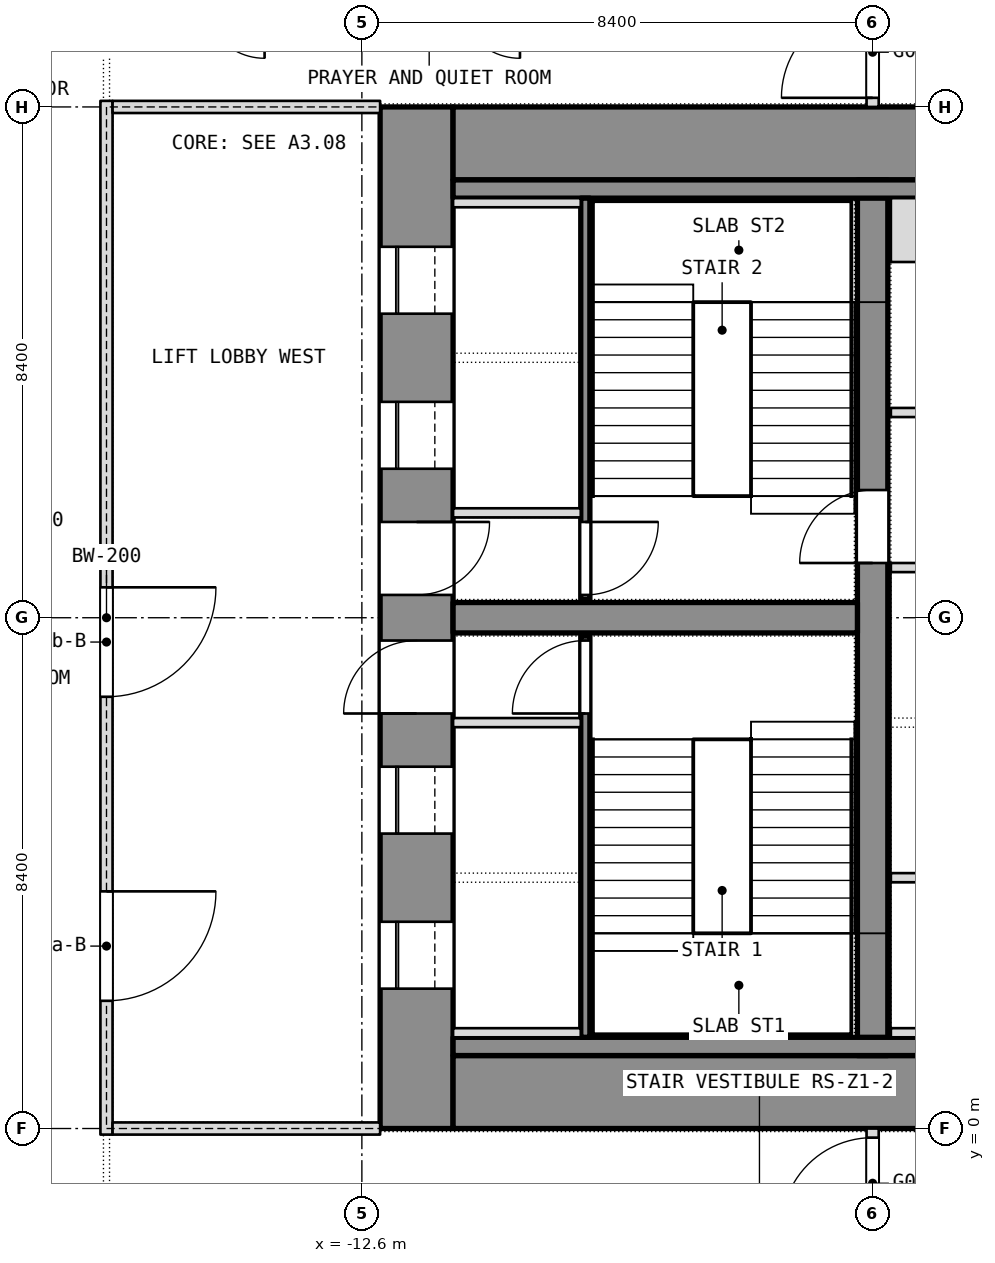
"""IFC4 building model, lengths in metres.
Left out: names, types, materials, properties, quantities, classifications, styles, units other than length and angle.
Written with IfcOpenShell. Run it as: python <this file> out.ifc"""

import sys

from ifc_helpers import new_model, si_unit, direction, frame, frame_2d, origin, place, context, subcontext, project, spatial, rectangle, extrude, element, fill, save


model = new_model("IFC4")
c1 = context("Model", 3, precision=1e-05, world=origin(), true_north=direction((0.0, 1.0)))
c2 = subcontext(c1, "Body", "Model", "MODEL_VIEW")
j1 = project(units=[si_unit("LENGTHUNIT", "METRE"), si_unit("PLANEANGLEUNIT", "RADIAN")], contexts=[c1])
p1 = place(None, origin())
s1 = spatial("IfcSite", under=j1, at=p1, CompositionType="ELEMENT")
p2 = place(p1, origin())
s2 = spatial("IfcBuilding", under=s1, at=p2, CompositionType="ELEMENT")
p3 = place(p2, frame((0.0, 0.0, 47.3)))
s3 = spatial("IfcBuildingStorey", under=s2, at=p3, CompositionType="ELEMENT", Elevation=47.3)
p4 = place(p3, frame((-11.7, 0.0, 0.0), z_axis=(0.0, 0.0, 1.0), x_axis=(0.0, 1.0, 0.0)))
e1 = element("IfcWall", 1, at=p4, inside=s3, PredefinedType="SHEAR", context=c2, shape_type="SweptSolid", body=[
    extrude(rectangle(XDim=16.8, YDim=1.2, at=frame_2d((8.4, 0.0))), origin(), (0.0, 0.0, 1.0), 3.6),
])
p5 = place(p4, frame((2.3, 0.0, 0.0)))
e2 = element("IfcOpeningElement", 2, at=p5, cuts=e1, PredefinedType="OPENING", context=c2, shape_type="SweptSolid", body=[
    extrude(rectangle(XDim=1.1, YDim=2.1, at=frame_2d((0.55, 1.05))), frame((0.0, 0.6, 0.0), z_axis=(0.0, -1.0, 0.0), x_axis=(1.0, 0.0, 0.0)), (0.0, 0.0, 1.0), 1.2),
])
p6 = place(p4, frame((4.85, 0.0, 0.0)))
e3 = element("IfcOpeningElement", 3, at=p6, cuts=e1, PredefinedType="OPENING", context=c2, shape_type="SweptSolid", body=[
    extrude(rectangle(XDim=1.1, YDim=2.1, at=frame_2d((0.55, 1.05))), frame((0.0, 0.6, 0.0), z_axis=(0.0, -1.0, 0.0), x_axis=(1.0, 0.0, 0.0)), (0.0, 0.0, 1.0), 1.2),
])
p7 = place(p4, frame((6.825, 0.0, 0.0)))
e4 = element("IfcOpeningElement", 4, at=p7, cuts=e1, PredefinedType="OPENING", context=c2, shape_type="SweptSolid", body=[
    extrude(rectangle(XDim=1.2, YDim=2.1, at=frame_2d((0.6, 1.05))), frame((0.0, 0.6, 0.0), z_axis=(0.0, -1.0, 0.0), x_axis=(1.0, 0.0, 0.0)), (0.0, 0.0, 1.0), 1.2),
])
p8 = place(p4, frame((13.4, 0.0, 0.0)))
e5 = element("IfcOpeningElement", 5, at=p8, cuts=e1, PredefinedType="OPENING", context=c2, shape_type="SweptSolid", body=[
    extrude(rectangle(XDim=1.1, YDim=2.1, at=frame_2d((0.55, 1.05))), frame((0.0, 0.6, 0.0), z_axis=(0.0, -1.0, 0.0), x_axis=(1.0, 0.0, 0.0)), (0.0, 0.0, 1.0), 1.2),
])
p9 = place(p4, frame((10.85, 0.0, 0.0)))
e6 = element("IfcOpeningElement", 6, at=p9, cuts=e1, PredefinedType="OPENING", context=c2, shape_type="SweptSolid", body=[
    extrude(rectangle(XDim=1.1, YDim=2.1, at=frame_2d((0.55, 1.05))), frame((0.0, 0.6, 0.0), z_axis=(0.0, -1.0, 0.0), x_axis=(1.0, 0.0, 0.0)), (0.0, 0.0, 1.0), 1.2),
])
p10 = place(p4, frame((8.775, 0.0, 0.0)))
e7 = element("IfcOpeningElement", 7, at=p10, cuts=e1, PredefinedType="OPENING", context=c2, shape_type="SweptSolid", body=[
    extrude(rectangle(XDim=1.2, YDim=2.1, at=frame_2d((0.6, 1.05))), frame((0.0, 0.6, 0.0), z_axis=(0.0, -1.0, 0.0), x_axis=(1.0, 0.0, 0.0)), (0.0, 0.0, 1.0), 1.2),
])
for number, where, z_axis, x_axis in (
    (8, (-11.1, 0.6, 0.0), (0.0, 0.0, 1.0), (1.0, 0.0, 0.0)),
    (9, (-11.1, 16.2, 0.0), (0.0, 0.0, 1.0), (1.0, 0.0, 0.0)),
):
    element("IfcWall", number, at=place(p3, frame(where, z_axis=z_axis, x_axis=x_axis)), inside=s3, PredefinedType="SHEAR", context=c2, shape_type="SweptSolid", body=[
        extrude(rectangle(XDim=22.2, YDim=1.2, at=frame_2d((11.1, 0.0))), origin(), (0.0, 0.0, 1.0), 3.6),
    ])
p11 = place(p3, frame((-4.2, 1.2, 0.0), z_axis=(0.0, 0.0, 1.0), x_axis=(0.0, 1.0, 0.0)))
e10 = element("IfcWall", 10, at=p11, inside=s3, PredefinedType="SHEAR", context=c2, shape_type="SweptSolid", body=[
    extrude(rectangle(XDim=14.4, YDim=0.5, at=frame_2d((7.2, 0.0))), origin(), (0.0, 0.0, 1.0), 3.6),
])
p12 = place(p11, frame((8.1, 0.0, 0.0)))
e11 = element("IfcOpeningElement", 11, at=p12, cuts=e10, PredefinedType="OPENING", context=c2, shape_type="SweptSolid", body=[
    extrude(rectangle(XDim=1.2, YDim=2.1, at=frame_2d((0.6, 1.05))), frame((0.0, 0.25, 0.0), z_axis=(0.0, -1.0, 0.0), x_axis=(1.0, 0.0, 0.0)), (0.0, 0.0, 1.0), 0.5),
])
p13 = place(p3, frame((-11.1, 8.4, 0.0), z_axis=(0.0, 0.0, 1.0), x_axis=(1.0, 0.0, 0.0)))
e12 = element("IfcWall", 12, at=p13, inside=s3, PredefinedType="SHEAR", context=c2, shape_type="SweptSolid", body=[
    extrude(rectangle(XDim=6.65, YDim=0.5, at=frame_2d((3.325, 0.0))), origin(), (0.0, 0.0, 1.0), 3.6),
])
p14 = place(p3, frame((-4.2, 16.8, 0.0), z_axis=(0.0, 0.0, 1.0), x_axis=(0.0, 1.0, 0.0)))
e13 = element("IfcWall", 13, at=p14, inside=s3, PredefinedType="PARTITIONING", context=c2, shape_type="SweptSolid", body=[
    extrude(rectangle(XDim=6.7, YDim=0.2, at=frame_2d((3.35, 0.0))), origin(), (0.0, 0.0, 1.0), 3.34),
])
p15 = place(p14, frame((0.15, 0.0, 0.0)))
e14 = element("IfcOpeningElement", 14, at=p15, cuts=e13, PredefinedType="OPENING", context=c2, shape_type="SweptSolid", body=[
    extrude(rectangle(XDim=1.5, YDim=2.1, at=frame_2d((0.75, 1.05))), frame((0.0, 0.1, 0.0), z_axis=(0.0, -1.0, 0.0), x_axis=(1.0, 0.0, 0.0)), (0.0, 0.0, 1.0), 0.2),
])
p16 = place(p14, frame((4.95, 0.0, 0.0)))
e15 = element("IfcOpeningElement", 15, at=p16, cuts=e13, PredefinedType="OPENING", context=c2, shape_type="SweptSolid", body=[
    extrude(rectangle(XDim=1.5, YDim=2.1, at=frame_2d((0.75, 1.05))), frame((0.0, 0.1, 0.0), z_axis=(0.0, -1.0, 0.0), x_axis=(1.0, 0.0, 0.0)), (0.0, 0.0, 1.0), 0.2),
])
p17 = place(p3, frame((-4.2, -12.7, 0.0), z_axis=(0.0, 0.0, 1.0), x_axis=(0.0, 1.0, 0.0)))
e16 = element("IfcWall", 16, at=p17, inside=s3, PredefinedType="PARTITIONING", context=c2, shape_type="SweptSolid", body=[
    extrude(rectangle(XDim=12.7, YDim=0.2, at=frame_2d((6.35, 0.0))), origin(), (0.0, 0.0, 1.0), 3.34),
])
p18 = place(p17, frame((11.05, 0.0, 0.0)))
e17 = element("IfcOpeningElement", 17, at=p18, cuts=e16, PredefinedType="OPENING", context=c2, shape_type="SweptSolid", body=[
    extrude(rectangle(XDim=1.5, YDim=2.1, at=frame_2d((0.75, 1.05))), frame((0.0, 0.1, 0.0), z_axis=(0.0, -1.0, 0.0), x_axis=(1.0, 0.0, 0.0)), (0.0, 0.0, 1.0), 0.2),
])
p19 = place(p17, frame((0.225, 0.0, 0.0)))
e18 = element("IfcOpeningElement", 18, at=p19, cuts=e16, PredefinedType="OPENING", context=c2, shape_type="SweptSolid", body=[
    extrude(rectangle(XDim=1.5, YDim=2.1, at=frame_2d((0.75, 1.05))), frame((0.0, 0.1, 0.0), z_axis=(0.0, -1.0, 0.0), x_axis=(1.0, 0.0, 0.0)), (0.0, 0.0, 1.0), 0.2),
])
for number, where, z_axis, x_axis in (
    (19, (-11.1, 1.35, 0.0), (0.0, 0.0, 1.0), (1.0, 0.0, 0.0)),
    (20, (-11.1, 15.45, 0.0), (0.0, 0.0, 1.0), (1.0, 0.0, 0.0)),
):
    element("IfcWall", number, at=place(p3, frame(where, z_axis=z_axis, x_axis=x_axis)), inside=s3, PredefinedType="PARTITIONING", context=c2, shape_type="SweptSolid", body=[
        extrude(rectangle(XDim=22.2, YDim=0.3, at=frame_2d((11.1, 0.0))), origin(), (0.0, 0.0, 1.0), 3.34),
    ])
p20 = place(p3, frame((-8.925, 1.5, 0.0), z_axis=(0.0, 0.0, 1.0), x_axis=(0.0, 1.0, 0.0)))
e21 = element("IfcWall", 21, at=p20, inside=s3, PredefinedType="SHEAR", context=c2, shape_type="SweptSolid", body=[
    extrude(rectangle(XDim=6.6, YDim=0.15, at=frame_2d((3.3, 0.0))), origin(), (0.0, 0.0, 1.0), 3.34),
])
p21 = place(p20, frame((5.325, 0.0, 0.0)))
e22 = element("IfcOpeningElement", 22, at=p21, cuts=e21, PredefinedType="OPENING", context=c2, shape_type="SweptSolid", body=[
    extrude(rectangle(XDim=1.2, YDim=2.1, at=frame_2d((0.6, 1.05))), frame((0.0, 0.075, 0.0), z_axis=(0.0, -1.0, 0.0), x_axis=(1.0, 0.0, 0.0)), (0.0, 0.0, 1.0), 0.15),
])
for number, where, z_axis, x_axis in (
    (23, (-11.1, 6.675, 0.0), (0.0, 0.0, 1.0), (1.0, 0.0, 0.0)),
    (24, (-11.1, 1.575, 0.0), (0.0, 0.0, 1.0), (1.0, 0.0, 0.0)),
):
    element("IfcWall", number, at=place(p3, frame(where, z_axis=z_axis, x_axis=x_axis)), inside=s3, PredefinedType="SHEAR", context=c2, shape_type="SweptSolid", body=[
        extrude(rectangle(XDim=2.1, YDim=0.15, at=frame_2d((1.05, 0.0))), origin(), (0.0, 0.0, 1.0), 3.6),
    ])
p22 = place(p3, frame((-8.925, 8.7, 0.0), z_axis=(0.0, 0.0, 1.0), x_axis=(0.0, 1.0, 0.0)))
e25 = element("IfcWall", 25, at=p22, inside=s3, PredefinedType="SHEAR", context=c2, shape_type="SweptSolid", body=[
    extrude(rectangle(XDim=6.6, YDim=0.15, at=frame_2d((3.3, 0.0))), origin(), (0.0, 0.0, 1.0), 3.34),
])
p23 = place(p22, frame((0.075, 0.0, 0.0)))
e26 = element("IfcOpeningElement", 26, at=p23, cuts=e25, PredefinedType="OPENING", context=c2, shape_type="SweptSolid", body=[
    extrude(rectangle(XDim=1.2, YDim=2.1, at=frame_2d((0.6, 1.05))), frame((0.0, 0.075, 0.0), z_axis=(0.0, -1.0, 0.0), x_axis=(1.0, 0.0, 0.0)), (0.0, 0.0, 1.0), 0.15),
])
for number, where, z_axis, x_axis in (
    (27, (-11.1, 10.125, 0.0), (0.0, 0.0, 1.0), (1.0, 0.0, 0.0)),
    (28, (-11.1, 15.225, 0.0), (0.0, 0.0, 1.0), (1.0, 0.0, 0.0)),
):
    element("IfcWall", number, at=place(p3, frame(where, z_axis=z_axis, x_axis=x_axis)), inside=s3, PredefinedType="SHEAR", context=c2, shape_type="SweptSolid", body=[
        extrude(rectangle(XDim=2.1, YDim=0.15, at=frame_2d((1.05, 0.0))), origin(), (0.0, 0.0, 1.0), 3.6),
    ])
p24 = place(p3, frame((-3.9, 4.125, 0.0), z_axis=(0.0, 0.0, 1.0), x_axis=(1.0, 0.0, 0.0)))
e29 = element("IfcWall", 29, at=p24, inside=s3, PredefinedType="PARTITIONING", context=c2, shape_type="SweptSolid", body=[
    extrude(rectangle(XDim=7.8, YDim=0.15, at=frame_2d((3.9, 0.0))), origin(), (0.0, 0.0, 1.0), 3.34),
])
p25 = place(p24, frame((3.75, 0.0, 0.0)))
e30 = element("IfcOpeningElement", 30, at=p25, cuts=e29, PredefinedType="OPENING", context=c2, shape_type="SweptSolid", body=[
    extrude(rectangle(XDim=1.2, YDim=2.1, at=frame_2d((0.6, 1.05))), frame((0.0, 0.075, 0.0), z_axis=(0.0, -1.0, 0.0), x_axis=(1.0, 0.0, 0.0)), (0.0, 0.0, 1.0), 0.15),
])
p26 = place(p3, frame((-3.9, 11.775, 0.0), z_axis=(0.0, 0.0, 1.0), x_axis=(1.0, 0.0, 0.0)))
e31 = element("IfcWall", 31, at=p26, inside=s3, PredefinedType="PARTITIONING", context=c2, shape_type="SweptSolid", body=[
    extrude(rectangle(XDim=7.8, YDim=0.15, at=frame_2d((3.9, 0.0))), origin(), (0.0, 0.0, 1.0), 3.34),
])
p27 = place(p26, frame((3.3, 0.0, 0.0)))
e32 = element("IfcOpeningElement", 32, at=p27, cuts=e31, PredefinedType="OPENING", context=c2, shape_type="SweptSolid", body=[
    extrude(rectangle(XDim=1.2, YDim=2.1, at=frame_2d((0.6, 1.05))), frame((0.0, 0.075, 0.0), z_axis=(0.0, -1.0, 0.0), x_axis=(1.0, 0.0, 0.0)), (0.0, 0.0, 1.0), 0.15),
])
p28 = place(p3, frame((-3.9, 1.575, 0.0), z_axis=(0.0, 0.0, 1.0), x_axis=(1.0, 0.0, 0.0)))
e33 = element("IfcWall", 33, at=p28, inside=s3, PredefinedType="SHEAR", context=c2, shape_type="SweptSolid", body=[
    extrude(rectangle(XDim=3.0, YDim=0.15, at=frame_2d((1.5, 0.0))), origin(), (0.0, 0.0, 1.0), 3.6),
])
p29 = place(p3, frame((-3.9, 9.225, 0.0), z_axis=(0.0, 0.0, 1.0), x_axis=(1.0, 0.0, 0.0)))
e34 = element("IfcWall", 34, at=p29, inside=s3, PredefinedType="SHEAR", context=c2, shape_type="SweptSolid", body=[
    extrude(rectangle(XDim=2.25, YDim=0.15, at=frame_2d((1.125, 0.0))), origin(), (0.0, 0.0, 1.0), 3.6),
])
p30 = place(p3, frame((-3.9, 14.775, 0.0), z_axis=(0.0, 0.0, 1.0), x_axis=(1.0, 0.0, 0.0)))
e35 = element("IfcWall", 35, at=p30, inside=s3, PredefinedType="PARTITIONING", context=c2, shape_type="SweptSolid", body=[
    extrude(rectangle(XDim=2.25, YDim=1.05, at=frame_2d((1.125, 0.0))), origin(), (0.0, 0.0, 1.0), 3.34),
])
p31 = place(p3, frame((-16.8, -0.1, 0.0), z_axis=(0.0, 0.0, 1.0), x_axis=(0.0, 1.0, 0.0)))
e36 = element("IfcWall", 36, at=p31, inside=s3, PredefinedType="PARTITIONING", context=c2, shape_type="SweptSolid", body=[
    extrude(rectangle(XDim=17.0, YDim=0.2, at=frame_2d((8.5, 0.0))), origin(), (0.0, 0.0, 1.0), 3.34),
])
p32 = place(p31, frame((2.2, 0.0, 0.0)))
e37 = element("IfcOpeningElement", 37, at=p32, cuts=e36, PredefinedType="OPENING", context=c2, shape_type="SweptSolid", body=[
    extrude(rectangle(XDim=1.8, YDim=2.1, at=frame_2d((0.9, 1.05))), frame((0.0, 0.1, 0.0), z_axis=(0.0, -1.0, 0.0), x_axis=(1.0, 0.0, 0.0)), (0.0, 0.0, 1.0), 0.2),
])
p33 = place(p31, frame((7.2, 0.0, 0.0)))
e38 = element("IfcOpeningElement", 38, at=p33, cuts=e36, PredefinedType="OPENING", context=c2, shape_type="SweptSolid", body=[
    extrude(rectangle(XDim=1.8, YDim=2.1, at=frame_2d((0.9, 1.05))), frame((0.0, 0.1, 0.0), z_axis=(0.0, -1.0, 0.0), x_axis=(1.0, 0.0, 0.0)), (0.0, 0.0, 1.0), 0.2),
])
for number, where, z_axis, x_axis in (
    (39, (-16.7, 0.0, 0.0), (0.0, 0.0, 1.0), (1.0, 0.0, 0.0)),
    (40, (-16.7, 16.8, 0.0), (0.0, 0.0, 1.0), (1.0, 0.0, 0.0)),
):
    element("IfcWall", number, at=place(p3, frame(where, z_axis=z_axis, x_axis=x_axis)), inside=s3, PredefinedType="PARTITIONING", context=c2, shape_type="SweptSolid", body=[
        extrude(rectangle(XDim=4.4, YDim=0.2, at=frame_2d((2.2, 0.0))), origin(), (0.0, 0.0, 1.0), 2.84),
    ])
p34 = place(p5, origin())
e41 = element("IfcDoor", 41, at=p34, inside=s3, OperationType="SLIDING_TO_LEFT", PredefinedType="DOOR", context=c2, shape_type="SweptSolid", body=[
    extrude(rectangle(XDim=1.1, YDim=2.1, at=frame_2d((0.55, 1.05))), frame((0.0, 0.025, 0.0), z_axis=(0.0, -1.0, 0.0), x_axis=(1.0, 0.0, 0.0)), (0.0, 0.0, 1.0), 0.05),
])
fill(e2, e41)
p35 = place(p6, origin())
e42 = element("IfcDoor", 42, at=p35, inside=s3, OperationType="SLIDING_TO_LEFT", PredefinedType="DOOR", context=c2, shape_type="SweptSolid", body=[
    extrude(rectangle(XDim=1.1, YDim=2.1, at=frame_2d((0.55, 1.05))), frame((0.0, 0.025, 0.0), z_axis=(0.0, -1.0, 0.0), x_axis=(1.0, 0.0, 0.0)), (0.0, 0.0, 1.0), 0.05),
])
fill(e3, e42)
p36 = place(p7, origin())
e43 = element("IfcDoor", 43, at=p36, inside=s3, OperationType="SINGLE_SWING_LEFT", PredefinedType="DOOR", context=c2, shape_type="SweptSolid", body=[
    extrude(rectangle(XDim=1.2, YDim=2.1, at=frame_2d((0.6, 1.05))), frame((0.0, 0.025, 0.0), z_axis=(0.0, -1.0, 0.0), x_axis=(1.0, 0.0, 0.0)), (0.0, 0.0, 1.0), 0.05),
])
fill(e4, e43)
p37 = place(p21, origin())
e44 = element("IfcDoor", 44, at=p37, inside=s3, OperationType="SINGLE_SWING_LEFT", PredefinedType="DOOR", context=c2, shape_type="SweptSolid", body=[
    extrude(rectangle(XDim=1.2, YDim=2.1, at=frame_2d((0.6, 1.05))), frame((0.0, 0.025, 0.0), z_axis=(0.0, -1.0, 0.0), x_axis=(1.0, 0.0, 0.0)), (0.0, 0.0, 1.0), 0.05),
])
fill(e22, e44)
p38 = place(p8, origin())
e45 = element("IfcDoor", 45, at=p38, inside=s3, OperationType="SLIDING_TO_LEFT", PredefinedType="DOOR", context=c2, shape_type="SweptSolid", body=[
    extrude(rectangle(XDim=1.1, YDim=2.1, at=frame_2d((0.55, 1.05))), frame((0.0, 0.025, 0.0), z_axis=(0.0, -1.0, 0.0), x_axis=(1.0, 0.0, 0.0)), (0.0, 0.0, 1.0), 0.05),
])
fill(e5, e45)
p39 = place(p9, origin())
e46 = element("IfcDoor", 46, at=p39, inside=s3, OperationType="SLIDING_TO_LEFT", PredefinedType="DOOR", context=c2, shape_type="SweptSolid", body=[
    extrude(rectangle(XDim=1.1, YDim=2.1, at=frame_2d((0.55, 1.05))), frame((0.0, 0.025, 0.0), z_axis=(0.0, -1.0, 0.0), x_axis=(1.0, 0.0, 0.0)), (0.0, 0.0, 1.0), 0.05),
])
fill(e6, e46)
p40 = place(p10, origin())
e47 = element("IfcDoor", 47, at=p40, inside=s3, OperationType="SINGLE_SWING_LEFT", PredefinedType="DOOR", context=c2, shape_type="SweptSolid", body=[
    extrude(rectangle(XDim=1.2, YDim=2.1, at=frame_2d((0.6, 1.05))), frame((0.0, 0.025, 0.0), z_axis=(0.0, -1.0, 0.0), x_axis=(1.0, 0.0, 0.0)), (0.0, 0.0, 1.0), 0.05),
])
fill(e7, e47)
p41 = place(p23, origin())
e48 = element("IfcDoor", 48, at=p41, inside=s3, OperationType="SINGLE_SWING_LEFT", PredefinedType="DOOR", context=c2, shape_type="SweptSolid", body=[
    extrude(rectangle(XDim=1.2, YDim=2.1, at=frame_2d((0.6, 1.05))), frame((0.0, 0.025, 0.0), z_axis=(0.0, -1.0, 0.0), x_axis=(1.0, 0.0, 0.0)), (0.0, 0.0, 1.0), 0.05),
])
fill(e26, e48)
p42 = place(p12, origin())
e49 = element("IfcDoor", 49, at=p42, inside=s3, OperationType="SINGLE_SWING_LEFT", PredefinedType="DOOR", context=c2, shape_type="SweptSolid", body=[
    extrude(rectangle(XDim=1.2, YDim=2.1, at=frame_2d((0.6, 1.05))), frame((0.0, 0.025, 0.0), z_axis=(0.0, -1.0, 0.0), x_axis=(1.0, 0.0, 0.0)), (0.0, 0.0, 1.0), 0.05),
])
fill(e11, e49)
p43 = place(p32, origin())
e50 = element("IfcDoor", 50, at=p43, inside=s3, OperationType="DOUBLE_DOOR_SINGLE_SWING", PredefinedType="DOOR", context=c2, shape_type="SweptSolid", body=[
    extrude(rectangle(XDim=1.8, YDim=2.1, at=frame_2d((0.9, 1.05))), frame((0.0, 0.025, 0.0), z_axis=(0.0, -1.0, 0.0), x_axis=(1.0, 0.0, 0.0)), (0.0, 0.0, 1.0), 0.05),
])
fill(e37, e50)
p44 = place(p33, origin())
e51 = element("IfcDoor", 51, at=p44, inside=s3, OperationType="DOUBLE_DOOR_SINGLE_SWING", PredefinedType="DOOR", context=c2, shape_type="SweptSolid", body=[
    extrude(rectangle(XDim=1.8, YDim=2.1, at=frame_2d((0.9, 1.05))), frame((0.0, 0.025, 0.0), z_axis=(0.0, -1.0, 0.0), x_axis=(1.0, 0.0, 0.0)), (0.0, 0.0, 1.0), 0.05),
])
fill(e38, e51)
p45 = place(p15, origin())
e52 = element("IfcDoor", 52, at=p45, inside=s3, OperationType="DOUBLE_DOOR_DOUBLE_SWING", PredefinedType="DOOR", context=c2, shape_type="SweptSolid", body=[
    extrude(rectangle(XDim=1.5, YDim=2.1, at=frame_2d((0.75, 1.05))), frame((0.0, 0.025, 0.0), z_axis=(0.0, -1.0, 0.0), x_axis=(1.0, 0.0, 0.0)), (0.0, 0.0, 1.0), 0.05),
])
fill(e14, e52)
p46 = place(p18, origin())
e53 = element("IfcDoor", 53, at=p46, inside=s3, OperationType="DOUBLE_DOOR_DOUBLE_SWING", PredefinedType="DOOR", context=c2, shape_type="SweptSolid", body=[
    extrude(rectangle(XDim=1.5, YDim=2.1, at=frame_2d((0.75, 1.05))), frame((0.0, 0.025, 0.0), z_axis=(0.0, -1.0, 0.0), x_axis=(1.0, 0.0, 0.0)), (0.0, 0.0, 1.0), 0.05),
])
fill(e17, e53)
save(model, sys.argv[1])
